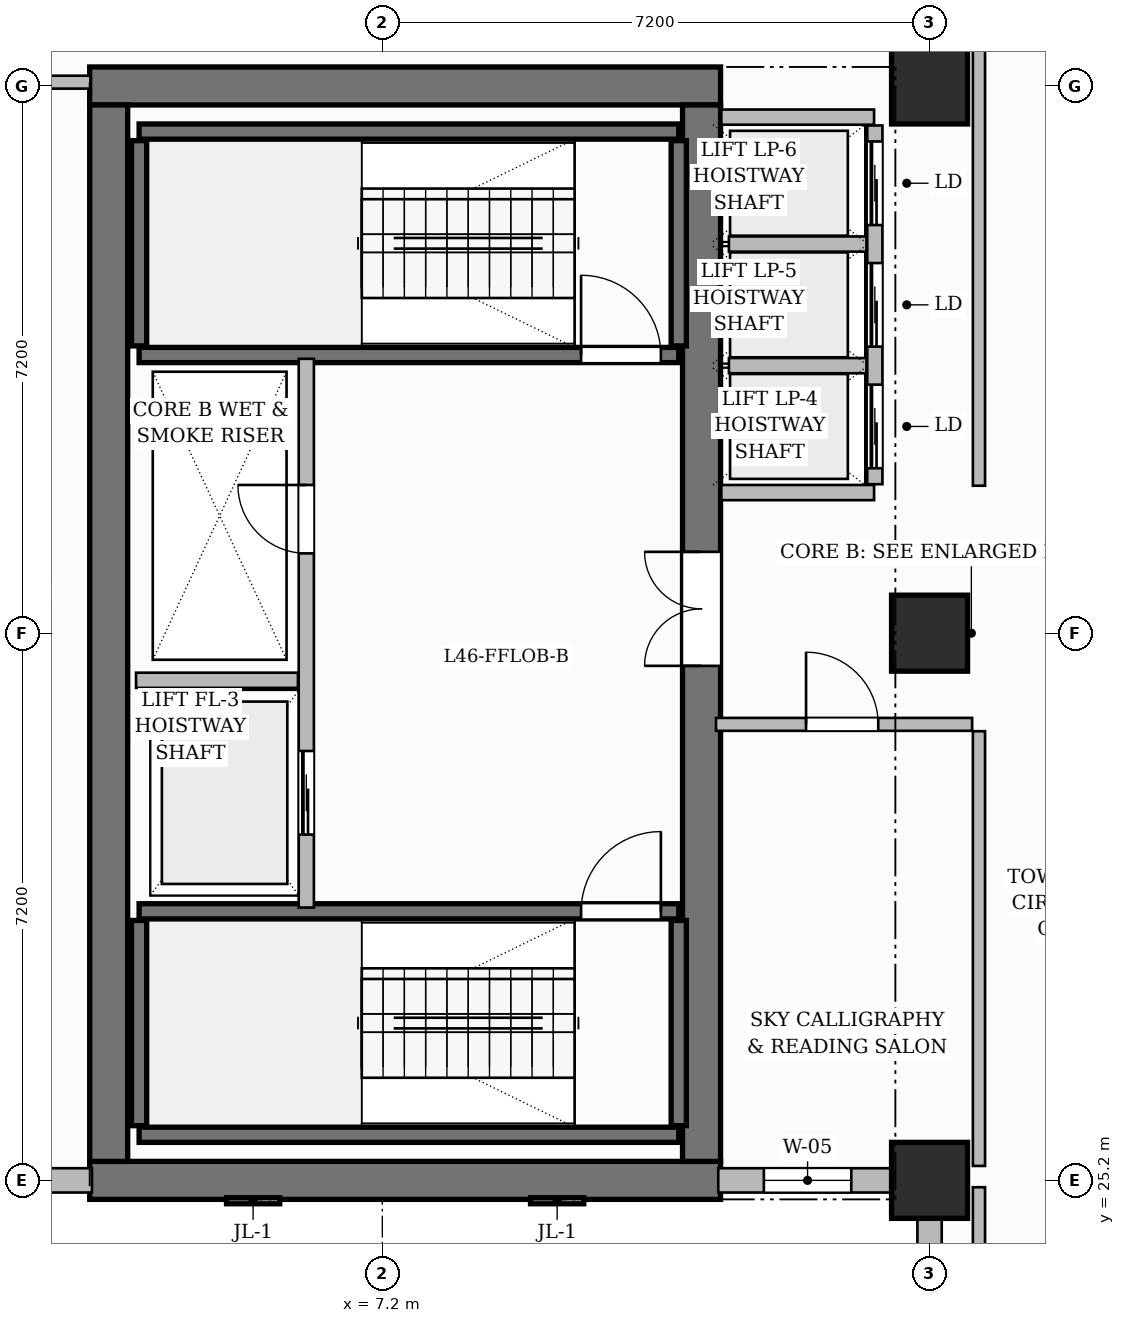
"""IFC4 building model, lengths in metres.
Left out: names, types, materials, properties, quantities, classifications, styles, units other than length and angle.
Written with IfcOpenShell. Run it as: python <this file> out.ifc"""

import sys

from ifc_helpers import new_model, si_unit, direction, frame, frame_2d, origin, origin_2d, place, context, subcontext, project, spatial, rectangle, extrude, source, transform, mapped, element, fill, save


model = new_model("IFC4")
c1 = context("Model", 3, precision=1e-05, world=origin(), true_north=direction((0.0, 1.0)))
c2 = subcontext(c1, "Body", "Model", "MODEL_VIEW")
j1 = project(units=[si_unit("LENGTHUNIT", "METRE"), si_unit("PLANEANGLEUNIT", "RADIAN")], contexts=[c1])
p1 = place(None, origin())
s1 = spatial("IfcSite", under=j1, at=p1, CompositionType="ELEMENT")
p2 = place(p1, origin())
s2 = spatial("IfcBuilding", under=s1, at=p2, CompositionType="ELEMENT")
p3 = place(p2, frame((0.0, 0.0, 184.95)))
s3 = spatial("IfcBuildingStorey", under=s2, at=p3, CompositionType="ELEMENT", Elevation=184.95)
for number, where, z_axis, x_axis in (
    (1, (3.35, 25.2, 0.0), (0.0, 0.0, 1.0), (1.0, 0.0, 0.0)),
    (2, (3.35, 39.6, 0.0), (0.0, 0.0, 1.0), (1.0, 0.0, 0.0)),
):
    element("IfcWall", number, at=place(p3, frame(where, z_axis=z_axis, x_axis=x_axis)), inside=s3, PredefinedType="SHEAR", context=c2, shape_type="SweptSolid", body=[
        extrude(rectangle(XDim=8.3, YDim=0.5, at=frame_2d((4.15, 0.0))), origin(), (0.0, 0.0, 1.0), 3.85),
    ])
p4 = place(p3, frame((3.6, 25.45, 0.0), z_axis=(0.0, 0.0, 1.0), x_axis=(0.0, 1.0, 0.0)))
e3 = element("IfcWall", 3, at=p4, inside=s3, PredefinedType="SHEAR", context=c2, shape_type="SweptSolid", body=[
    extrude(rectangle(XDim=13.9, YDim=0.5, at=frame_2d((6.95, 0.0))), origin(), (0.0, 0.0, 1.0), 3.85),
])
p5 = place(p3, frame((11.4, 25.45, 0.0), z_axis=(0.0, 0.0, 1.0), x_axis=(0.0, 1.0, 0.0)))
e4 = element("IfcWall", 4, at=p5, inside=s3, PredefinedType="SHEAR", context=c2, shape_type="SweptSolid", body=[
    extrude(rectangle(XDim=13.9, YDim=0.5, at=frame_2d((6.95, 0.0))), origin(), (0.0, 0.0, 1.0), 3.85),
])
p6 = place(p5, frame((6.52, 0.0, 0.0)))
e5 = element("IfcOpeningElement", 5, at=p6, cuts=e4, PredefinedType="OPENING", context=c2, shape_type="SweptSolid", body=[
    extrude(rectangle(XDim=1.5, YDim=2.2, at=frame_2d((0.75, 1.1))), frame((0.0, 0.26, 0.0), z_axis=(0.0, -1.0, 0.0), x_axis=(1.0, 0.0, 0.0)), (0.0, 0.0, 1.0), 0.52),
])
m1 = source(origin(), c2, "Body", "SweptSolid", [
    extrude(rectangle(XDim=1.0, YDim=1.0, at=origin_2d()), origin(), (0.0, 0.0, 1.0), 3.85),
])
for number, where, z_axis, x_axis in (
    (6, (14.4, 25.2, 0.0), (0.0, 0.0, 1.0), (1.0, 0.0, 0.0)),
    (7, (14.4, 32.4, 0.0), (0.0, 0.0, 1.0), (1.0, 0.0, 0.0)),
    (8, (14.4, 39.6, 0.0), (0.0, 0.0, 1.0), (1.0, 0.0, 0.0)),
):
    element("IfcColumn", number, at=place(p3, frame(where, z_axis=z_axis, x_axis=x_axis)), inside=s3, PredefinedType="COLUMN", context=c2, shape_type="MappedRepresentation", body=[
        mapped(m1, transform((0.0, 0.0, 0.0), scale=1.0)),
    ])
p7 = place(p3, frame((4.0, 25.8, 0.0), z_axis=(0.0, 0.0, 1.0), x_axis=(1.0, 0.0, 0.0)))
e9 = element("IfcWall", 9, at=p7, inside=s3, PredefinedType="SHEAR", context=c2, shape_type="SweptSolid", body=[
    extrude(rectangle(XDim=7.1, YDim=0.2, at=frame_2d((3.55, 0.0))), origin(), (0.0, 0.0, 1.0), 3.85),
])
for number, where, z_axis, x_axis in (
    (10, (4.0, 25.92, 0.0), (0.0, 0.0, 1.0), (0.0, 1.0, 0.0)),
    (11, (11.1, 25.92, 0.0), (0.0, 0.0, 1.0), (0.0, 1.0, 0.0)),
):
    element("IfcWall", number, at=place(p3, frame(where, z_axis=z_axis, x_axis=x_axis)), inside=s3, PredefinedType="SHEAR", context=c2, shape_type="SweptSolid", body=[
        extrude(rectangle(XDim=2.7, YDim=0.2, at=frame_2d((1.35, 0.0))), origin(), (0.0, 0.0, 1.0), 3.85),
    ])
p8 = place(p3, frame((4.0, 28.74, 0.0), z_axis=(0.0, 0.0, 1.0), x_axis=(1.0, 0.0, 0.0)))
e12 = element("IfcWall", 12, at=p8, inside=s3, PredefinedType="SHEAR", context=c2, shape_type="SweptSolid", body=[
    extrude(rectangle(XDim=7.1, YDim=0.2, at=frame_2d((3.55, 0.0))), origin(), (0.0, 0.0, 1.0), 3.85),
])
p9 = place(p8, frame((5.815, 0.0, 0.0)))
e13 = element("IfcOpeningElement", 13, at=p9, cuts=e12, PredefinedType="OPENING", context=c2, shape_type="SweptSolid", body=[
    extrude(rectangle(XDim=1.05, YDim=2.2, at=frame_2d((0.525, 1.1))), frame((0.0, 0.11, 0.0), z_axis=(0.0, -1.0, 0.0), x_axis=(1.0, 0.0, 0.0)), (0.0, 0.0, 1.0), 0.22),
])
p10 = place(p3, frame((4.0, 39.0, 0.0), z_axis=(0.0, 0.0, 1.0), x_axis=(1.0, 0.0, 0.0)))
e14 = element("IfcWall", 14, at=p10, inside=s3, PredefinedType="SHEAR", context=c2, shape_type="SweptSolid", body=[
    extrude(rectangle(XDim=7.1, YDim=0.2, at=frame_2d((3.55, 0.0))), origin(), (0.0, 0.0, 1.0), 3.85),
])
for number, where, z_axis, x_axis in (
    (15, (4.0, 36.18, 0.0), (0.0, 0.0, 1.0), (0.0, 1.0, 0.0)),
    (16, (11.1, 36.18, 0.0), (0.0, 0.0, 1.0), (0.0, 1.0, 0.0)),
):
    element("IfcWall", number, at=place(p3, frame(where, z_axis=z_axis, x_axis=x_axis)), inside=s3, PredefinedType="SHEAR", context=c2, shape_type="SweptSolid", body=[
        extrude(rectangle(XDim=2.7, YDim=0.2, at=frame_2d((1.35, 0.0))), origin(), (0.0, 0.0, 1.0), 3.85),
    ])
p11 = place(p3, frame((4.0, 36.06, 0.0), z_axis=(0.0, 0.0, 1.0), x_axis=(1.0, 0.0, 0.0)))
e17 = element("IfcWall", 17, at=p11, inside=s3, PredefinedType="SHEAR", context=c2, shape_type="SweptSolid", body=[
    extrude(rectangle(XDim=7.1, YDim=0.2, at=frame_2d((3.55, 0.0))), origin(), (0.0, 0.0, 1.0), 3.85),
])
p12 = place(p11, frame((5.815, 0.0, 0.0)))
e18 = element("IfcOpeningElement", 18, at=p12, cuts=e17, PredefinedType="OPENING", context=c2, shape_type="SweptSolid", body=[
    extrude(rectangle(XDim=1.05, YDim=2.2, at=frame_2d((0.525, 1.1))), frame((0.0, 0.11, 0.0), z_axis=(0.0, -1.0, 0.0), x_axis=(1.0, 0.0, 0.0)), (0.0, 0.0, 1.0), 0.22),
])
p13 = place(p3, frame((6.2, 28.79, 0.0), z_axis=(0.0, 0.0, 1.0), x_axis=(0.0, 1.0, 0.0)))
e19 = element("IfcWall", 19, at=p13, inside=s3, PredefinedType="PARTITIONING", context=c2, shape_type="SweptSolid", body=[
    extrude(rectangle(XDim=7.22, YDim=0.2, at=frame_2d((3.61, 0.0))), origin(), (0.0, 0.0, 1.0), 3.6),
])
p14 = place(p13, frame((4.66, 0.0, 0.0)))
e20 = element("IfcOpeningElement", 20, at=p14, cuts=e19, PredefinedType="OPENING", context=c2, shape_type="SweptSolid", body=[
    extrude(rectangle(XDim=0.9, YDim=2.1, at=frame_2d((0.45, 1.05))), frame((0.0, 0.11, 0.0), z_axis=(0.0, -1.0, 0.0), x_axis=(1.0, 0.0, 0.0)), (0.0, 0.0, 1.0), 0.22),
])
p15 = place(p13, frame((0.96, 0.0, 0.0)))
e21 = element("IfcOpeningElement", 21, at=p15, cuts=e19, PredefinedType="OPENING", context=c2, shape_type="SweptSolid", body=[
    extrude(rectangle(XDim=1.1, YDim=2.2, at=frame_2d((0.55, 1.1))), frame((0.0, 0.11, 0.0), z_axis=(0.0, -1.0, 0.0), x_axis=(1.0, 0.0, 0.0)), (0.0, 0.0, 1.0), 0.22),
])
p16 = place(p3, frame((3.96, 31.78, 0.0), z_axis=(0.0, 0.0, 1.0), x_axis=(1.0, 0.0, 0.0)))
e22 = element("IfcWall", 22, at=p16, inside=s3, PredefinedType="PARTITIONING", context=c2, shape_type="SweptSolid", body=[
    extrude(rectangle(XDim=2.13, YDim=0.2, at=frame_2d((1.065, 0.0))), origin(), (0.0, 0.0, 1.0), 3.6),
])
for number, where, z_axis, x_axis in (
    (23, (11.66, 34.25, 0.0), (0.0, 0.0, 1.0), (1.0, 0.0, 0.0)),
    (24, (11.66, 39.19, 0.0), (0.0, 0.0, 1.0), (1.0, 0.0, 0.0)),
):
    element("IfcWall", number, at=place(p3, frame(where, z_axis=z_axis, x_axis=x_axis)), inside=s3, PredefinedType="PARTITIONING", context=c2, shape_type="SweptSolid", body=[
        extrude(rectangle(XDim=2.01, YDim=0.2, at=frame_2d((1.005, 0.0))), origin(), (0.0, 0.0, 1.0), 3.6),
    ])
p17 = place(p3, frame((13.68, 34.36, 0.0), z_axis=(0.0, 0.0, 1.0), x_axis=(0.0, 1.0, 0.0)))
e25 = element("IfcWall", 25, at=p17, inside=s3, PredefinedType="PARTITIONING", context=c2, shape_type="SweptSolid", body=[
    extrude(rectangle(XDim=4.72, YDim=0.2, at=frame_2d((2.36, 0.0))), origin(), (0.0, 0.0, 1.0), 3.6),
])
p18 = place(p17, frame((0.21, 0.0, 0.0)))
e26 = element("IfcOpeningElement", 26, at=p18, cuts=e25, PredefinedType="OPENING", context=c2, shape_type="SweptSolid", body=[
    extrude(rectangle(XDim=1.1, YDim=2.2, at=frame_2d((0.55, 1.1))), frame((0.0, 0.11, 0.0), z_axis=(0.0, -1.0, 0.0), x_axis=(1.0, 0.0, 0.0)), (0.0, 0.0, 1.0), 0.22),
])
p19 = place(p17, frame((1.81, 0.0, 0.0)))
e27 = element("IfcOpeningElement", 27, at=p19, cuts=e25, PredefinedType="OPENING", context=c2, shape_type="SweptSolid", body=[
    extrude(rectangle(XDim=1.1, YDim=2.2, at=frame_2d((0.55, 1.1))), frame((0.0, 0.11, 0.0), z_axis=(0.0, -1.0, 0.0), x_axis=(1.0, 0.0, 0.0)), (0.0, 0.0, 1.0), 0.22),
])
p20 = place(p17, frame((3.41, 0.0, 0.0)))
e28 = element("IfcOpeningElement", 28, at=p20, cuts=e25, PredefinedType="OPENING", context=c2, shape_type="SweptSolid", body=[
    extrude(rectangle(XDim=1.1, YDim=2.2, at=frame_2d((0.55, 1.1))), frame((0.0, 0.11, 0.0), z_axis=(0.0, -1.0, 0.0), x_axis=(1.0, 0.0, 0.0)), (0.0, 0.0, 1.0), 0.22),
])
for number, where, z_axis, x_axis in (
    (29, (11.76, 35.92, 0.0), (0.0, 0.0, 1.0), (1.0, 0.0, 0.0)),
    (30, (11.76, 37.52, 0.0), (0.0, 0.0, 1.0), (1.0, 0.0, 0.0)),
):
    element("IfcWall", number, at=place(p3, frame(where, z_axis=z_axis, x_axis=x_axis)), inside=s3, PredefinedType="PARTITIONING", context=c2, shape_type="SweptSolid", body=[
        extrude(rectangle(XDim=1.81, YDim=0.2, at=frame_2d((0.905, 0.0))), origin(), (0.0, 0.0, 1.0), 3.6),
    ])
p21 = place(p3, frame((15.05, 12.36, 0.0), z_axis=(0.0, 0.0, 1.0), x_axis=(0.0, 1.0, 0.0)))
e31 = element("IfcWall", 31, at=p21, inside=s3, PredefinedType="PARTITIONING", context=c2, shape_type="SweptSolid", body=[
    extrude(rectangle(XDim=12.75, YDim=0.16, at=frame_2d((6.375, 0.0))), origin(), (0.0, 0.0, 1.0), 3.6),
])
p22 = place(p3, frame((0.24, 39.65, 0.0), z_axis=(0.0, 0.0, 1.0), x_axis=(1.0, 0.0, 0.0)))
e32 = element("IfcWall", 32, at=p22, inside=s3, PredefinedType="PARTITIONING", context=c2, shape_type="SweptSolid", body=[
    extrude(rectangle(XDim=3.12, YDim=0.17, at=frame_2d((1.56, 0.0))), origin(), (0.0, 0.0, 1.0), 3.6),
])
p23 = place(p22, frame((1.11, 0.0, 0.0)))
e33 = element("IfcOpeningElement", 33, at=p23, cuts=e32, PredefinedType="OPENING", context=c2, shape_type="SweptSolid", body=[
    extrude(rectangle(XDim=0.9, YDim=2.15, at=frame_2d((0.45, 1.075))), frame((0.0, 0.095, 0.0), z_axis=(0.0, -1.0, 0.0), x_axis=(1.0, 0.0, 0.0)), (0.0, 0.0, 1.0), 0.19),
])
p24 = place(p3, frame((15.05, 34.34, 0.0), z_axis=(0.0, 0.0, 1.0), x_axis=(0.0, 1.0, 0.0)))
e34 = element("IfcWall", 34, at=p24, inside=s3, PredefinedType="PARTITIONING", context=c2, shape_type="SweptSolid", body=[
    extrude(rectangle(XDim=12.292, YDim=0.16, at=frame_2d((6.146, 0.0))), origin(), (0.0, 0.0, 1.0), 3.6),
])
p25 = place(p24, frame((8.01, 0.0, 0.0)))
e35 = element("IfcOpeningElement", 35, at=p25, cuts=e34, PredefinedType="OPENING", context=c2, shape_type="SweptSolid", body=[
    extrude(rectangle(XDim=1.6, YDim=2.4, at=frame_2d((0.8, 1.2))), frame((0.0, 0.09, 0.0), z_axis=(0.0, -1.0, 0.0), x_axis=(1.0, 0.0, 0.0)), (0.0, 0.0, 1.0), 0.18),
])
p26 = place(p3, frame((15.05, 25.39, 0.0), z_axis=(0.0, 0.0, 1.0), x_axis=(0.0, 1.0, 0.0)))
e36 = element("IfcWall", 36, at=p26, inside=s3, PredefinedType="PARTITIONING", context=c2, shape_type="SweptSolid", body=[
    extrude(rectangle(XDim=5.72, YDim=0.16, at=frame_2d((2.86, 0.0))), origin(), (0.0, 0.0, 1.0), 3.6),
])
p27 = place(p3, frame((11.59, 31.2, 0.0), z_axis=(0.0, 0.0, 1.0), x_axis=(1.0, 0.0, 0.0)))
e37 = element("IfcWall", 37, at=p27, inside=s3, PredefinedType="PARTITIONING", context=c2, shape_type="SweptSolid", body=[
    extrude(rectangle(XDim=3.37, YDim=0.17, at=frame_2d((1.685, 0.0))), origin(), (0.0, 0.0, 1.0), 3.6),
])
p28 = place(p27, frame((1.185, 0.0, 0.0)))
e38 = element("IfcOpeningElement", 38, at=p28, cuts=e37, PredefinedType="OPENING", context=c2, shape_type="SweptSolid", body=[
    extrude(rectangle(XDim=0.95, YDim=2.15, at=frame_2d((0.475, 1.075))), frame((0.0, 0.095, 0.0), z_axis=(0.0, -1.0, 0.0), x_axis=(1.0, 0.0, 0.0)), (0.0, 0.0, 1.0), 0.19),
])
p29 = place(p3, frame((14.4, 0.05, 0.0), z_axis=(0.0, 0.0, 1.0), x_axis=(0.0, 1.0, 0.0)))
e39 = element("IfcWall", 39, at=p29, inside=s3, PredefinedType="SOLIDWALL", context=c2, shape_type="SweptSolid", body=[
    extrude(rectangle(XDim=25.1, YDim=0.32, at=frame_2d((12.55, 0.0))), origin(), (0.0, 0.0, 1.0), 3.085),
])
p30 = place(p29, frame((3.4, 0.0, 0.0)))
e40 = element("IfcOpeningElement", 40, at=p30, cuts=e39, PredefinedType="OPENING", context=c2, shape_type="SweptSolid", body=[
    extrude(rectangle(XDim=1.2, YDim=2.2, at=frame_2d((0.6, 1.1))), frame((0.0, 0.17, 0.0), z_axis=(0.0, -1.0, 0.0), x_axis=(1.0, 0.0, 0.0)), (0.0, 0.0, 1.0), 0.34),
])
p31 = place(p29, frame((1.225, 0.0, 0.8)))
e41 = element("IfcOpeningElement", 41, at=p31, cuts=e39, PredefinedType="OPENING", context=c2, shape_type="SweptSolid", body=[
    extrude(rectangle(XDim=1.4, YDim=1.85, at=frame_2d((0.7, 0.925))), frame((0.0, 0.17, 0.0), z_axis=(0.0, -1.0, 0.0), x_axis=(1.0, 0.0, 0.0)), (0.0, 0.0, 1.0), 0.34),
])
p32 = place(p29, frame((5.15, 0.0, 0.8)))
e42 = element("IfcOpeningElement", 42, at=p32, cuts=e39, PredefinedType="OPENING", context=c2, shape_type="SweptSolid", body=[
    extrude(rectangle(XDim=0.95, YDim=1.75, at=frame_2d((0.475, 0.875))), frame((0.0, 0.17, 0.0), z_axis=(0.0, -1.0, 0.0), x_axis=(1.0, 0.0, 0.0)), (0.0, 0.0, 1.0), 0.34),
])
p33 = place(p29, frame((8.421, 0.0, 0.8)))
e43 = element("IfcOpeningElement", 43, at=p33, cuts=e39, PredefinedType="OPENING", context=c2, shape_type="SweptSolid", body=[
    extrude(rectangle(XDim=1.4, YDim=1.85, at=frame_2d((0.7, 0.925))), frame((0.0, 0.17, 0.0), z_axis=(0.0, -1.0, 0.0), x_axis=(1.0, 0.0, 0.0)), (0.0, 0.0, 1.0), 0.34),
])
p34 = place(p29, frame((10.685, 0.0, 0.8)))
e44 = element("IfcOpeningElement", 44, at=p34, cuts=e39, PredefinedType="OPENING", context=c2, shape_type="SweptSolid", body=[
    extrude(rectangle(XDim=1.15, YDim=1.8, at=frame_2d((0.575, 0.9))), frame((0.0, 0.17, 0.0), z_axis=(0.0, -1.0, 0.0), x_axis=(1.0, 0.0, 0.0)), (0.0, 0.0, 1.0), 0.34),
])
p35 = place(p29, frame((12.414, 0.0, 0.8)))
e45 = element("IfcOpeningElement", 45, at=p35, cuts=e39, PredefinedType="OPENING", context=c2, shape_type="SweptSolid", body=[
    extrude(rectangle(XDim=0.95, YDim=1.75, at=frame_2d((0.475, 0.875))), frame((0.0, 0.17, 0.0), z_axis=(0.0, -1.0, 0.0), x_axis=(1.0, 0.0, 0.0)), (0.0, 0.0, 1.0), 0.34),
])
p36 = place(p29, frame((15.675, 0.0, 0.8)))
e46 = element("IfcOpeningElement", 46, at=p36, cuts=e39, PredefinedType="OPENING", context=c2, shape_type="SweptSolid", body=[
    extrude(rectangle(XDim=1.8, YDim=1.85, at=frame_2d((0.9, 0.925))), frame((0.0, 0.17, 0.0), z_axis=(0.0, -1.0, 0.0), x_axis=(1.0, 0.0, 0.0)), (0.0, 0.0, 1.0), 0.34),
])
p37 = place(p29, frame((18.425, 0.0, 0.8)))
e47 = element("IfcOpeningElement", 47, at=p37, cuts=e39, PredefinedType="OPENING", context=c2, shape_type="SweptSolid", body=[
    extrude(rectangle(XDim=1.8, YDim=1.85, at=frame_2d((0.9, 0.925))), frame((0.0, 0.17, 0.0), z_axis=(0.0, -1.0, 0.0), x_axis=(1.0, 0.0, 0.0)), (0.0, 0.0, 1.0), 0.34),
])
p38 = place(p29, frame((22.65, 0.0, 0.8)))
e48 = element("IfcOpeningElement", 48, at=p38, cuts=e39, PredefinedType="OPENING", context=c2, shape_type="SweptSolid", body=[
    extrude(rectangle(XDim=1.4, YDim=1.85, at=frame_2d((0.7, 0.925))), frame((0.0, 0.17, 0.0), z_axis=(0.0, -1.0, 0.0), x_axis=(1.0, 0.0, 0.0)), (0.0, 0.0, 1.0), 0.34),
])
p39 = place(p3, frame((11.62, 25.2, 0.0), z_axis=(0.0, 0.0, 1.0), x_axis=(1.0, 0.0, 0.0)))
e49 = element("IfcWall", 49, at=p39, inside=s3, PredefinedType="SOLIDWALL", context=c2, shape_type="SweptSolid", body=[
    extrude(rectangle(XDim=2.78, YDim=0.32, at=frame_2d((1.39, 0.0))), origin(), (0.0, 0.0, 1.0), 3.085),
])
p40 = place(p39, frame((0.6, 0.0, 0.8)))
e50 = element("IfcOpeningElement", 50, at=p40, cuts=e49, PredefinedType="OPENING", context=c2, shape_type="SweptSolid", body=[
    extrude(rectangle(XDim=1.15, YDim=1.8, at=frame_2d((0.575, 0.9))), frame((0.0, 0.17, 0.0), z_axis=(0.0, -1.0, 0.0), x_axis=(1.0, 0.0, 0.0)), (0.0, 0.0, 1.0), 0.34),
])
p41 = place(p3, frame((0.0, 25.2, 0.0), z_axis=(0.0, 0.0, 1.0), x_axis=(1.0, 0.0, 0.0)))
e51 = element("IfcWall", 51, at=p41, inside=s3, PredefinedType="SOLIDWALL", context=c2, shape_type="SweptSolid", body=[
    extrude(rectangle(XDim=3.38, YDim=0.32, at=frame_2d((1.69, 0.0))), origin(), (0.0, 0.0, 1.0), 3.6),
])
p42 = place(p41, frame((1.205, 0.0, 0.8)))
e52 = element("IfcOpeningElement", 52, at=p42, cuts=e51, PredefinedType="OPENING", context=c2, shape_type="SweptSolid", body=[
    extrude(rectangle(XDim=1.4, YDim=1.85, at=frame_2d((0.7, 0.925))), frame((0.0, 0.17, 0.0), z_axis=(0.0, -1.0, 0.0), x_axis=(1.0, 0.0, 0.0)), (0.0, 0.0, 1.0), 0.34),
])
m2 = source(origin(), c2, "Body", "SweptSolid", [
    extrude(rectangle(XDim=1.05, YDim=2.2, at=frame_2d((0.525, 1.1))), frame((0.0, 0.025, 0.0), z_axis=(0.0, -1.0, 0.0), x_axis=(1.0, 0.0, 0.0)), (0.0, 0.0, 1.0), 0.05),
])
p43 = place(p9, origin())
e53 = element("IfcDoor", 53, at=p43, inside=s3, OperationType="SINGLE_SWING_RIGHT", PredefinedType="DOOR", context=c2, shape_type="MappedRepresentation", body=[
    mapped(m2, transform((0.0, 0.0, 0.0), scale=1.0)),
])
fill(e13, e53)
p44 = place(p12, origin())
e54 = element("IfcDoor", 54, at=p44, inside=s3, OperationType="SINGLE_SWING_LEFT", PredefinedType="DOOR", context=c2, shape_type="MappedRepresentation", body=[
    mapped(m2, transform((0.0, 0.0, 0.0), scale=1.0)),
])
fill(e18, e54)
m3 = source(origin(), c2, "Body", "SweptSolid", [
    extrude(rectangle(XDim=0.9, YDim=2.1, at=frame_2d((0.45, 1.05))), frame((0.0, 0.025, 0.0), z_axis=(0.0, -1.0, 0.0), x_axis=(1.0, 0.0, 0.0)), (0.0, 0.0, 1.0), 0.05),
])
p45 = place(p14, origin())
e55 = element("IfcDoor", 55, at=p45, inside=s3, OperationType="SINGLE_SWING_RIGHT", PredefinedType="DOOR", context=c2, shape_type="MappedRepresentation", body=[
    mapped(m3, transform((0.0, 0.0, 0.0), scale=1.0)),
])
fill(e20, e55)
m4 = source(origin(), c2, "Body", "SweptSolid", [
    extrude(rectangle(XDim=1.5, YDim=2.2, at=frame_2d((0.75, 1.1))), frame((0.0, 0.025, 0.0), z_axis=(0.0, -1.0, 0.0), x_axis=(1.0, 0.0, 0.0)), (0.0, 0.0, 1.0), 0.05),
])
p46 = place(p6, origin())
e56 = element("IfcDoor", 56, at=p46, inside=s3, OperationType="DOUBLE_DOOR_SINGLE_SWING", PredefinedType="DOOR", context=c2, shape_type="MappedRepresentation", body=[
    mapped(m4, transform((0.0, 0.0, 0.0), scale=1.0)),
])
fill(e5, e56)
m5 = source(origin(), c2, "Body", "SweptSolid", [
    extrude(rectangle(XDim=0.95, YDim=2.15, at=frame_2d((0.475, 1.075))), frame((0.0, 0.025, 0.0), z_axis=(0.0, -1.0, 0.0), x_axis=(1.0, 0.0, 0.0)), (0.0, 0.0, 1.0), 0.05),
])
p47 = place(p28, origin())
e57 = element("IfcDoor", 57, at=p47, inside=s3, OperationType="SINGLE_SWING_LEFT", PredefinedType="DOOR", context=c2, shape_type="MappedRepresentation", body=[
    mapped(m5, transform((0.0, 0.0, 0.0), scale=1.0)),
])
fill(e38, e57)
m6 = source(origin(), c2, "Body", "SweptSolid", [
    extrude(rectangle(XDim=1.1, YDim=2.2, at=frame_2d((0.55, 1.1))), frame((0.0, 0.025, 0.0), z_axis=(0.0, -1.0, 0.0), x_axis=(1.0, 0.0, 0.0)), (0.0, 0.0, 1.0), 0.05),
])
p48 = place(p15, origin())
e58 = element("IfcDoor", 58, at=p48, inside=s3, OperationType="SLIDING_TO_LEFT", PredefinedType="DOOR", context=c2, shape_type="MappedRepresentation", body=[
    mapped(m6, transform((0.0, 0.0, 0.0), scale=1.0)),
])
fill(e21, e58)
p49 = place(p18, origin())
e59 = element("IfcDoor", 59, at=p49, inside=s3, OperationType="SLIDING_TO_LEFT", PredefinedType="DOOR", context=c2, shape_type="MappedRepresentation", body=[
    mapped(m6, transform((0.0, 0.0, 0.0), scale=1.0)),
])
fill(e26, e59)
p50 = place(p19, origin())
e60 = element("IfcDoor", 60, at=p50, inside=s3, OperationType="SLIDING_TO_LEFT", PredefinedType="DOOR", context=c2, shape_type="MappedRepresentation", body=[
    mapped(m6, transform((0.0, 0.0, 0.0), scale=1.0)),
])
fill(e27, e60)
p51 = place(p20, origin())
e61 = element("IfcDoor", 61, at=p51, inside=s3, OperationType="SLIDING_TO_LEFT", PredefinedType="DOOR", context=c2, shape_type="MappedRepresentation", body=[
    mapped(m6, transform((0.0, 0.0, 0.0), scale=1.0)),
])
fill(e28, e61)
m7 = source(origin(), c2, "Body", "SweptSolid", [
    extrude(rectangle(XDim=1.15, YDim=1.8, at=frame_2d((0.575, 0.9))), frame((0.0, 0.03, 0.0), z_axis=(0.0, -1.0, 0.0), x_axis=(1.0, 0.0, 0.0)), (0.0, 0.0, 1.0), 0.06),
])
p52 = place(p40, origin())
e62 = element("IfcWindow", 62, at=p52, inside=s3, PartitioningType="SINGLE_PANEL", PredefinedType="WINDOW", context=c2, shape_type="MappedRepresentation", body=[
    mapped(m7, transform((0.0, 0.0, 0.0), scale=1.0)),
])
fill(e50, e62)
save(model, sys.argv[1])
